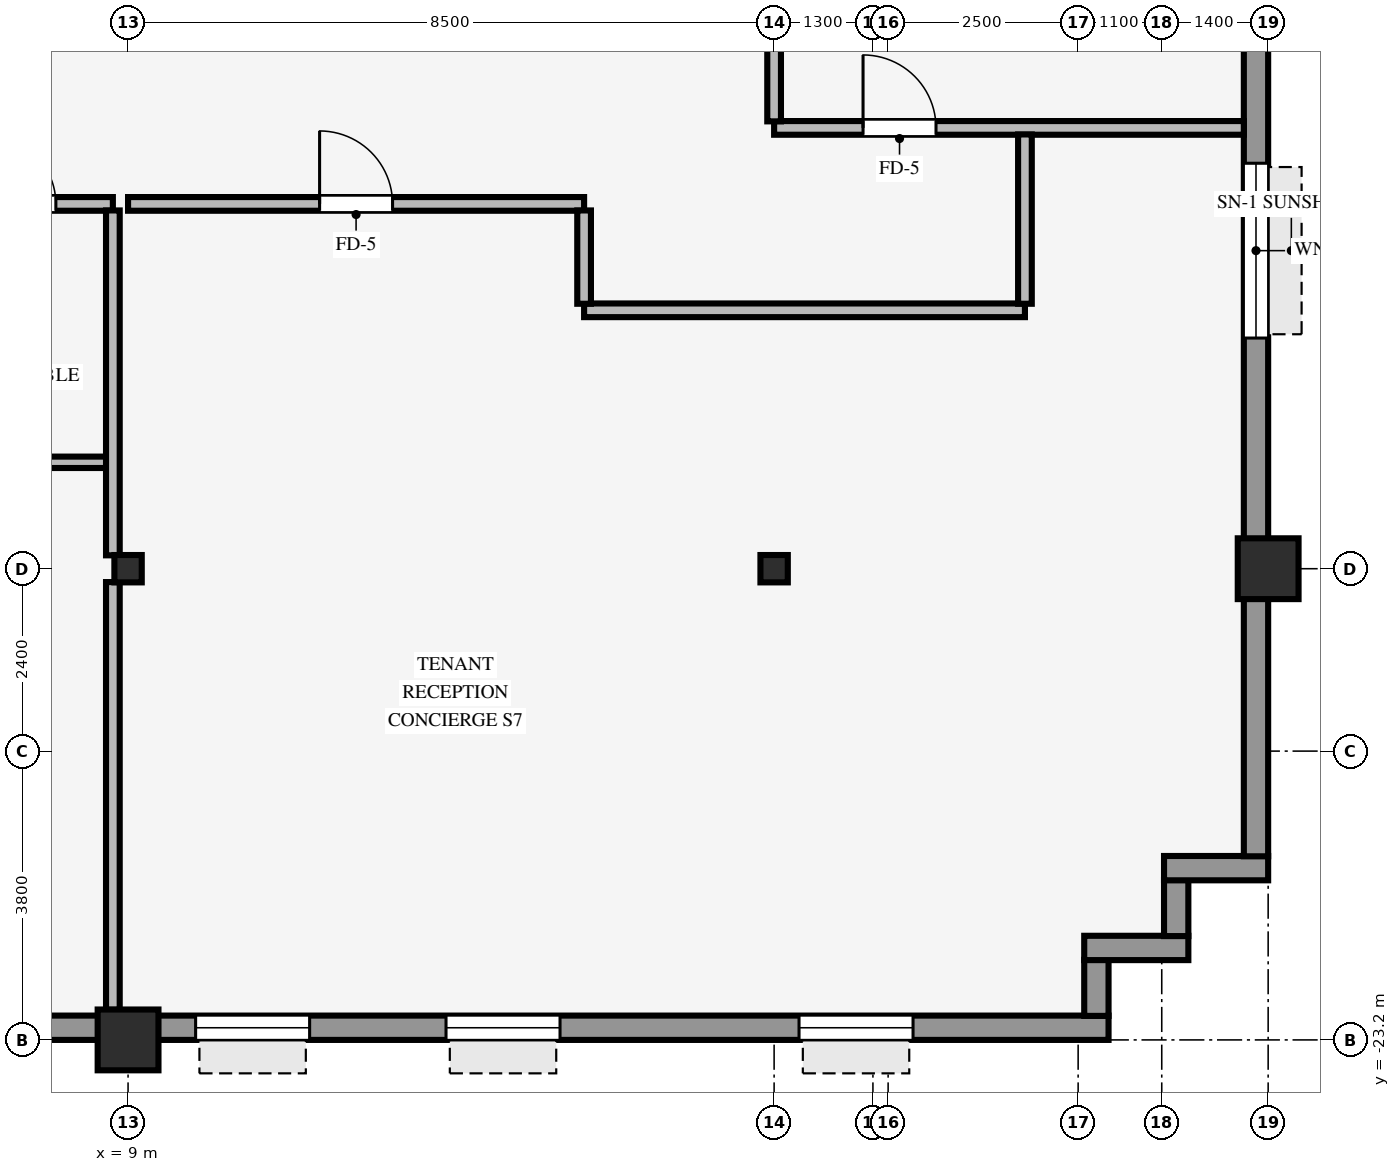
"""IFC4 building model, lengths in metres.
Left out: names, types, materials, properties, quantities, classifications, styles, units other than length and angle.
Written with IfcOpenShell. Run it as: python <this file> out.ifc"""

import sys

from ifc_helpers import new_model, si_unit, direction, frame, frame_2d, origin, origin_2d, place, context, subcontext, project, spatial, rectangle, hollow_rectangle, i_section, extrude, source, transform, mapped, element, fill, save


model = new_model("IFC4")
c1 = context("Model", 3, precision=1e-05, world=origin(), true_north=direction((0.0, 1.0)))
c2 = subcontext(c1, "Body", "Model", "MODEL_VIEW")
j1 = project(units=[si_unit("LENGTHUNIT", "METRE"), si_unit("PLANEANGLEUNIT", "RADIAN")], contexts=[c1])
p1 = place(None, origin())
s1 = spatial("IfcSite", under=j1, at=p1, CompositionType="ELEMENT")
p2 = place(p1, origin())
s2 = spatial("IfcBuilding", under=s1, at=p2, CompositionType="ELEMENT")
p3 = place(p2, frame((0.0, 0.0, 89.65)))
s3 = spatial("IfcBuildingStorey", under=s2, at=p3, CompositionType="ELEMENT", Elevation=89.65)
for number, where, z_axis, x_axis in (
    (1, (24.0, -17.0, 0.0), (0.0, 0.0, 1.0), (1.0, 0.0, 0.0)),
    (2, (9.0, -23.2, 0.0), (0.0, 0.0, 1.0), (1.0, 0.0, 0.0)),
):
    element("IfcColumn", number, at=place(p3, frame(where, z_axis=z_axis, x_axis=x_axis)), inside=s3, PredefinedType="COLUMN", context=c2, shape_type="SweptSolid", body=[
        extrude(hollow_rectangle(XDim=0.8, YDim=0.8, WallThickness=0.055, InnerFilletRadius=0.055, OuterFilletRadius=0.11, at=origin_2d()), origin(), (0.0, 0.0, 1.0), 3.25),
    ])
for number, where, z_axis, x_axis in (
    (3, (9.0, -17.0, 0.0), (0.0, 0.0, 1.0), (1.0, 0.0, 0.0)),
    (4, (17.5, -17.0, 0.0), (0.0, 0.0, 1.0), (1.0, 0.0, 0.0)),
):
    element("IfcColumn", number, at=place(p3, frame(where, z_axis=z_axis, x_axis=x_axis)), inside=s3, PredefinedType="COLUMN", context=c2, shape_type="SweptSolid", body=[
        extrude(i_section(OverallWidth=0.36, OverallDepth=0.36, WebThickness=0.021, FlangeThickness=0.021, FilletRadius=0.018, at=origin_2d()), origin(), (0.0, 0.0, 1.0), 3.25),
    ])
p4 = place(p3, frame((-21.9, -23.04, 0.0), z_axis=(0.0, 0.0, 1.0), x_axis=(1.0, 0.0, 0.0)))
e5 = element("IfcWall", 5, at=p4, inside=s3, PredefinedType="STANDARD", context=c2, shape_type="SweptSolid", body=[
    extrude(rectangle(XDim=43.8, YDim=0.32, at=frame_2d((21.9, 0.0))), origin(), (0.0, 0.0, 1.0), 2.585),
])
p5 = place(p4, frame((1.672, 0.0, 0.8)))
e6 = element("IfcOpeningElement", 6, at=p5, cuts=e5, PredefinedType="OPENING", context=c2, shape_type="SweptSolid", body=[
    extrude(rectangle(XDim=1.5, YDim=1.6, at=frame_2d((0.75, 0.8))), frame((0.0, 0.17, 0.0), z_axis=(0.0, -1.0, 0.0), x_axis=(1.0, 0.0, 0.0)), (0.0, 0.0, 1.0), 0.34),
])
p6 = place(p4, frame((6.317, 0.0, 0.8)))
e7 = element("IfcOpeningElement", 7, at=p6, cuts=e5, PredefinedType="OPENING", context=c2, shape_type="SweptSolid", body=[
    extrude(rectangle(XDim=1.5, YDim=1.6, at=frame_2d((0.75, 0.8))), frame((0.0, 0.17, 0.0), z_axis=(0.0, -1.0, 0.0), x_axis=(1.0, 0.0, 0.0)), (0.0, 0.0, 1.0), 0.34),
])
p7 = place(p4, frame((17.856, 0.0, 0.8)))
e8 = element("IfcOpeningElement", 8, at=p7, cuts=e5, PredefinedType="OPENING", context=c2, shape_type="SweptSolid", body=[
    extrude(rectangle(XDim=1.5, YDim=1.6, at=frame_2d((0.75, 0.8))), frame((0.0, 0.17, 0.0), z_axis=(0.0, -1.0, 0.0), x_axis=(1.0, 0.0, 0.0)), (0.0, 0.0, 1.0), 0.34),
])
p8 = place(p4, frame((25.794, 0.0, 0.8)))
e9 = element("IfcOpeningElement", 9, at=p8, cuts=e5, PredefinedType="OPENING", context=c2, shape_type="SweptSolid", body=[
    extrude(rectangle(XDim=1.5, YDim=1.6, at=frame_2d((0.75, 0.8))), frame((0.0, 0.17, 0.0), z_axis=(0.0, -1.0, 0.0), x_axis=(1.0, 0.0, 0.0)), (0.0, 0.0, 1.0), 0.34),
])
p9 = place(p4, frame((31.789, 0.0, 0.8)))
e10 = element("IfcOpeningElement", 10, at=p9, cuts=e5, PredefinedType="OPENING", context=c2, shape_type="SweptSolid", body=[
    extrude(rectangle(XDim=1.5, YDim=1.6, at=frame_2d((0.75, 0.8))), frame((0.0, 0.17, 0.0), z_axis=(0.0, -1.0, 0.0), x_axis=(1.0, 0.0, 0.0)), (0.0, 0.0, 1.0), 0.34),
])
p10 = place(p4, frame((35.083, 0.0, 0.8)))
e11 = element("IfcOpeningElement", 11, at=p10, cuts=e5, PredefinedType="OPENING", context=c2, shape_type="SweptSolid", body=[
    extrude(rectangle(XDim=1.5, YDim=1.6, at=frame_2d((0.75, 0.8))), frame((0.0, 0.17, 0.0), z_axis=(0.0, -1.0, 0.0), x_axis=(1.0, 0.0, 0.0)), (0.0, 0.0, 1.0), 0.34),
])
p11 = place(p4, frame((39.728, 0.0, 0.8)))
e12 = element("IfcOpeningElement", 12, at=p11, cuts=e5, PredefinedType="OPENING", context=c2, shape_type="SweptSolid", body=[
    extrude(rectangle(XDim=1.5, YDim=1.6, at=frame_2d((0.75, 0.8))), frame((0.0, 0.17, 0.0), z_axis=(0.0, -1.0, 0.0), x_axis=(1.0, 0.0, 0.0)), (0.0, 0.0, 1.0), 0.34),
])
p12 = place(p3, frame((21.74, -22.884, 0.0), z_axis=(0.0, 0.0, 1.0), x_axis=(0.0, 1.0, 0.0)))
e13 = element("IfcWall", 13, at=p12, inside=s3, PredefinedType="STANDARD", context=c2, shape_type="SweptSolid", body=[
    extrude(rectangle(XDim=0.738, YDim=0.32, at=frame_2d((0.369, 0.0))), origin(), (0.0, 0.0, 1.0), 3.24),
])
p13 = place(p3, frame((21.58, -21.99, 0.0), z_axis=(0.0, 0.0, 1.0), x_axis=(1.0, 0.0, 0.0)))
e14 = element("IfcWall", 14, at=p13, inside=s3, PredefinedType="STANDARD", context=c2, shape_type="SweptSolid", body=[
    extrude(rectangle(XDim=1.37, YDim=0.32, at=frame_2d((0.685, 0.0))), origin(), (0.0, 0.0, 1.0), 3.24),
])
p14 = place(p3, frame((22.79, -21.834, 0.0), z_axis=(0.0, 0.0, 1.0), x_axis=(0.0, 1.0, 0.0)))
e15 = element("IfcWall", 15, at=p14, inside=s3, PredefinedType="STANDARD", context=c2, shape_type="SweptSolid", body=[
    extrude(rectangle(XDim=0.738, YDim=0.32, at=frame_2d((0.369, 0.0))), origin(), (0.0, 0.0, 1.0), 3.24),
])
p15 = place(p3, frame((22.63, -20.94, 0.0), z_axis=(0.0, 0.0, 1.0), x_axis=(1.0, 0.0, 0.0)))
e16 = element("IfcWall", 16, at=p15, inside=s3, PredefinedType="STANDARD", context=c2, shape_type="SweptSolid", body=[
    extrude(rectangle(XDim=1.37, YDim=0.32, at=frame_2d((0.685, 0.0))), origin(), (0.0, 0.0, 1.0), 3.24),
])
p16 = place(p3, frame((23.84, -20.784, 0.0), z_axis=(0.0, 0.0, 1.0), x_axis=(0.0, 1.0, 0.0)))
e17 = element("IfcWall", 17, at=p16, inside=s3, PredefinedType="STANDARD", context=c2, shape_type="SweptSolid", body=[
    extrude(rectangle(XDim=41.568, YDim=0.32, at=frame_2d((20.784, 0.0))), origin(), (0.0, 0.0, 1.0), 2.585),
])
p17 = place(p16, frame((6.819, 0.0, 0.8)))
e18 = element("IfcOpeningElement", 18, at=p17, cuts=e17, PredefinedType="OPENING", context=c2, shape_type="SweptSolid", body=[
    extrude(rectangle(XDim=2.3, YDim=1.62, at=frame_2d((1.15, 0.81))), frame((0.0, 0.17, 0.0), z_axis=(0.0, -1.0, 0.0), x_axis=(1.0, 0.0, 0.0)), (0.0, 0.0, 1.0), 0.34),
])
p18 = place(p16, frame((12.215, 0.0, 0.8)))
e19 = element("IfcOpeningElement", 19, at=p18, cuts=e17, PredefinedType="OPENING", context=c2, shape_type="SweptSolid", body=[
    extrude(rectangle(XDim=2.3, YDim=1.62, at=frame_2d((1.15, 0.81))), frame((0.0, 0.17, 0.0), z_axis=(0.0, -1.0, 0.0), x_axis=(1.0, 0.0, 0.0)), (0.0, 0.0, 1.0), 0.34),
])
p19 = place(p16, frame((17.161, 0.0, 0.8)))
e20 = element("IfcOpeningElement", 20, at=p19, cuts=e17, PredefinedType="OPENING", context=c2, shape_type="SweptSolid", body=[
    extrude(rectangle(XDim=2.3, YDim=1.62, at=frame_2d((1.15, 0.81))), frame((0.0, 0.17, 0.0), z_axis=(0.0, -1.0, 0.0), x_axis=(1.0, 0.0, 0.0)), (0.0, 0.0, 1.0), 0.34),
])
p20 = place(p16, frame((27.053, 0.0, 0.8)))
e21 = element("IfcOpeningElement", 21, at=p20, cuts=e17, PredefinedType="OPENING", context=c2, shape_type="SweptSolid", body=[
    extrude(rectangle(XDim=2.3, YDim=1.62, at=frame_2d((1.15, 0.81))), frame((0.0, 0.17, 0.0), z_axis=(0.0, -1.0, 0.0), x_axis=(1.0, 0.0, 0.0)), (0.0, 0.0, 1.0), 0.34),
])
p21 = place(p16, frame((32.449, 0.0, 0.8)))
e22 = element("IfcOpeningElement", 22, at=p21, cuts=e17, PredefinedType="OPENING", context=c2, shape_type="SweptSolid", body=[
    extrude(rectangle(XDim=2.3, YDim=1.62, at=frame_2d((1.15, 0.81))), frame((0.0, 0.17, 0.0), z_axis=(0.0, -1.0, 0.0), x_axis=(1.0, 0.0, 0.0)), (0.0, 0.0, 1.0), 0.34),
])
p22 = place(p3, frame((1.2, -15.6, 0.0), z_axis=(0.0, 0.0, 1.0), x_axis=(1.0, 0.0, 0.0)))
e23 = element("IfcWall", 23, at=p22, inside=s3, PredefinedType="PARTITIONING", context=c2, shape_type="SweptSolid", body=[
    extrude(rectangle(XDim=7.514, YDim=0.15, at=frame_2d((3.757, 0.0))), origin(), (0.0, 0.0, 1.0), 3.24),
])
p23 = place(p3, frame((15.0, -13.6, 0.0), z_axis=(0.0, 0.0, 1.0), x_axis=(1.0, 0.0, 0.0)))
e24 = element("IfcWall", 24, at=p23, inside=s3, PredefinedType="PARTITIONING", context=c2, shape_type="SweptSolid", body=[
    extrude(rectangle(XDim=5.8, YDim=0.18, at=frame_2d((2.9, 0.0))), origin(), (0.0, 0.0, 1.0), 2.878),
])
p24 = place(p3, frame((-15.0, -12.2, 0.0), z_axis=(0.0, 0.0, 1.0), x_axis=(1.0, 0.0, 0.0)))
e25 = element("IfcWall", 25, at=p24, inside=s3, PredefinedType="PARTITIONING", context=c2, shape_type="SweptSolid", body=[
    extrude(rectangle(XDim=23.8, YDim=0.18, at=frame_2d((11.9, 0.0))), origin(), (0.0, 0.0, 1.0), 3.24),
])
p25 = place(p24, frame((7.325, 0.0, 0.0)))
e26 = element("IfcOpeningElement", 26, at=p25, cuts=e25, PredefinedType="OPENING", context=c2, shape_type="SweptSolid", body=[
    extrude(rectangle(XDim=0.96, YDim=2.1, at=frame_2d((0.48, 1.05))), frame((0.0, 0.1, 0.0), z_axis=(0.0, -1.0, 0.0), x_axis=(1.0, 0.0, 0.0)), (0.0, 0.0, 1.0), 0.2),
])
p26 = place(p24, frame((2.8, 0.0, 0.0)))
e27 = element("IfcOpeningElement", 27, at=p26, cuts=e25, PredefinedType="OPENING", context=c2, shape_type="SweptSolid", body=[
    extrude(rectangle(XDim=0.96, YDim=2.1, at=frame_2d((0.48, 1.05))), frame((0.0, 0.1, 0.0), z_axis=(0.0, -1.0, 0.0), x_axis=(1.0, 0.0, 0.0)), (0.0, 0.0, 1.0), 0.2),
])
p27 = place(p24, frame((19.65, 0.0, 0.0)))
e28 = element("IfcOpeningElement", 28, at=p27, cuts=e25, PredefinedType="OPENING", context=c2, shape_type="SweptSolid", body=[
    extrude(rectangle(XDim=0.9, YDim=2.1, at=frame_2d((0.45, 1.05))), frame((0.0, 0.1, 0.0), z_axis=(0.0, -1.0, 0.0), x_axis=(1.0, 0.0, 0.0)), (0.0, 0.0, 1.0), 0.2),
])
p28 = place(p24, frame((17.05, 0.0, 0.0)))
e29 = element("IfcOpeningElement", 29, at=p28, cuts=e25, PredefinedType="OPENING", context=c2, shape_type="SweptSolid", body=[
    extrude(rectangle(XDim=0.9, YDim=2.1, at=frame_2d((0.45, 1.05))), frame((0.0, 0.1, 0.0), z_axis=(0.0, -1.0, 0.0), x_axis=(1.0, 0.0, 0.0)), (0.0, 0.0, 1.0), 0.2),
])
p29 = place(p24, frame((22.15, 0.0, 0.0)))
e30 = element("IfcOpeningElement", 30, at=p29, cuts=e25, PredefinedType="OPENING", context=c2, shape_type="SweptSolid", body=[
    extrude(rectangle(XDim=0.9, YDim=2.1, at=frame_2d((0.45, 1.05))), frame((0.0, 0.1, 0.0), z_axis=(0.0, -1.0, 0.0), x_axis=(1.0, 0.0, 0.0)), (0.0, 0.0, 1.0), 0.2),
])
p30 = place(p24, frame((12.52, 0.0, 0.0)))
e31 = element("IfcOpeningElement", 31, at=p30, cuts=e25, PredefinedType="OPENING", context=c2, shape_type="SweptSolid", body=[
    extrude(rectangle(XDim=0.96, YDim=2.1, at=frame_2d((0.48, 1.05))), frame((0.0, 0.1, 0.0), z_axis=(0.0, -1.0, 0.0), x_axis=(1.0, 0.0, 0.0)), (0.0, 0.0, 1.0), 0.2),
])
p31 = place(p24, frame((14.72, 0.0, 0.0)))
e32 = element("IfcOpeningElement", 32, at=p31, cuts=e25, PredefinedType="OPENING", context=c2, shape_type="SweptSolid", body=[
    extrude(rectangle(XDim=0.96, YDim=2.1, at=frame_2d((0.48, 1.05))), frame((0.0, 0.1, 0.0), z_axis=(0.0, -1.0, 0.0), x_axis=(1.0, 0.0, 0.0)), (0.0, 0.0, 1.0), 0.2),
])
p32 = place(p3, frame((9.0, -12.2, 0.0), z_axis=(0.0, 0.0, 1.0), x_axis=(1.0, 0.0, 0.0)))
e33 = element("IfcWall", 33, at=p32, inside=s3, PredefinedType="PARTITIONING", context=c2, shape_type="SweptSolid", body=[
    extrude(rectangle(XDim=6.0, YDim=0.18, at=frame_2d((3.0, 0.0))), origin(), (0.0, 0.0, 1.0), 3.24),
])
p33 = place(p32, frame((2.52, 0.0, 0.0)))
e34 = element("IfcOpeningElement", 34, at=p33, cuts=e33, PredefinedType="OPENING", context=c2, shape_type="SweptSolid", body=[
    extrude(rectangle(XDim=0.96, YDim=2.1, at=frame_2d((0.48, 1.05))), frame((0.0, 0.1, 0.0), z_axis=(0.0, -1.0, 0.0), x_axis=(1.0, 0.0, 0.0)), (0.0, 0.0, 1.0), 0.2),
])
p34 = place(p3, frame((17.5, -11.2, 0.0), z_axis=(0.0, 0.0, 1.0), x_axis=(1.0, 0.0, 0.0)))
e35 = element("IfcWall", 35, at=p34, inside=s3, PredefinedType="PARTITIONING", context=c2, shape_type="SweptSolid", body=[
    extrude(rectangle(XDim=6.18, YDim=0.18, at=frame_2d((3.09, 0.0))), origin(), (0.0, 0.0, 1.0), 3.24),
])
p35 = place(p34, frame((1.17, 0.0, 0.0)))
e36 = element("IfcOpeningElement", 36, at=p35, cuts=e35, PredefinedType="OPENING", context=c2, shape_type="SweptSolid", body=[
    extrude(rectangle(XDim=0.96, YDim=2.1, at=frame_2d((0.48, 1.05))), frame((0.0, 0.1, 0.0), z_axis=(0.0, -1.0, 0.0), x_axis=(1.0, 0.0, 0.0)), (0.0, 0.0, 1.0), 0.2),
])
p36 = place(p3, frame((8.8, -22.804, 0.0), z_axis=(0.0, 0.0, 1.0), x_axis=(0.0, 1.0, 0.0)))
e37 = element("IfcWall", 37, at=p36, inside=s3, PredefinedType="PARTITIONING", context=c2, shape_type="SweptSolid", body=[
    extrude(rectangle(XDim=5.628, YDim=0.18, at=frame_2d((2.814, 0.0))), origin(), (0.0, 0.0, 1.0), 2.335),
])
p37 = place(p3, frame((8.8, -16.824, 0.0), z_axis=(0.0, 0.0, 1.0), x_axis=(0.0, 1.0, 0.0)))
e38 = element("IfcWall", 38, at=p37, inside=s3, PredefinedType="PARTITIONING", context=c2, shape_type="SweptSolid", body=[
    extrude(rectangle(XDim=4.538, YDim=0.18, at=frame_2d((2.269, 0.0))), origin(), (0.0, 0.0, 1.0), 2.335),
])
p38 = place(p3, frame((15.0, -13.514, 0.0), z_axis=(0.0, 0.0, 1.0), x_axis=(0.0, 1.0, 0.0)))
e39 = element("IfcWall", 39, at=p38, inside=s3, PredefinedType="PARTITIONING", context=c2, shape_type="SweptSolid", body=[
    extrude(rectangle(XDim=1.228, YDim=0.18, at=frame_2d((0.614, 0.0))), origin(), (0.0, 0.0, 1.0), 3.24),
])
p39 = place(p3, frame((17.5, -11.114, 0.0), z_axis=(0.0, 0.0, 1.0), x_axis=(0.0, 1.0, 0.0)))
e40 = element("IfcWall", 40, at=p39, inside=s3, PredefinedType="PARTITIONING", context=c2, shape_type="SweptSolid", body=[
    extrude(rectangle(XDim=0.968, YDim=0.18, at=frame_2d((0.484, 0.0))), origin(), (0.0, 0.0, 1.0), 2.335),
])
p40 = place(p3, frame((20.8, -13.514, 0.0), z_axis=(0.0, 0.0, 1.0), x_axis=(0.0, 1.0, 0.0)))
e41 = element("IfcWall", 41, at=p40, inside=s3, PredefinedType="PARTITIONING", context=c2, shape_type="SweptSolid", body=[
    extrude(rectangle(XDim=2.228, YDim=0.18, at=frame_2d((1.114, 0.0))), origin(), (0.0, 0.0, 1.0), 3.24),
])
m1 = source(origin(), c2, "Body", "SweptSolid", [
    extrude(rectangle(XDim=1.5, YDim=1.6, at=frame_2d((0.75, 0.8))), frame((0.0, 0.03, 0.0), z_axis=(0.0, -1.0, 0.0), x_axis=(1.0, 0.0, 0.0)), (0.0, 0.0, 1.0), 0.06),
])
p41 = place(p9, origin())
e42 = element("IfcWindow", 42, at=p41, inside=s3, PartitioningType="SINGLE_PANEL", PredefinedType="WINDOW", context=c2, shape_type="MappedRepresentation", body=[
    mapped(m1, transform((0.0, 0.0, 0.0), scale=1.0)),
])
fill(e10, e42)
p42 = place(p10, origin())
e43 = element("IfcWindow", 43, at=p42, inside=s3, PartitioningType="SINGLE_PANEL", PredefinedType="WINDOW", context=c2, shape_type="MappedRepresentation", body=[
    mapped(m1, transform((0.0, 0.0, 0.0), scale=1.0)),
])
fill(e11, e43)
p43 = place(p11, origin())
e44 = element("IfcWindow", 44, at=p43, inside=s3, PartitioningType="SINGLE_PANEL", PredefinedType="WINDOW", context=c2, shape_type="MappedRepresentation", body=[
    mapped(m1, transform((0.0, 0.0, 0.0), scale=1.0)),
])
fill(e12, e44)
m2 = source(origin(), c2, "Body", "SweptSolid", [
    extrude(rectangle(XDim=2.3, YDim=1.62, at=frame_2d((1.15, 0.81))), frame((0.0, 0.03, 0.0), z_axis=(0.0, -1.0, 0.0), x_axis=(1.0, 0.0, 0.0)), (0.0, 0.0, 1.0), 0.06),
])
p44 = place(p17, origin())
e45 = element("IfcWindow", 45, at=p44, inside=s3, PartitioningType="SINGLE_PANEL", PredefinedType="WINDOW", context=c2, shape_type="MappedRepresentation", body=[
    mapped(m2, transform((0.0, 0.0, 0.0), scale=1.0)),
])
fill(e18, e45)
m3 = source(origin(), c2, "Body", "SweptSolid", [
    extrude(rectangle(XDim=0.96, YDim=2.1, at=frame_2d((0.48, 1.05))), frame((0.0, 0.025, 0.0), z_axis=(0.0, -1.0, 0.0), x_axis=(1.0, 0.0, 0.0)), (0.0, 0.0, 1.0), 0.05),
])
p45 = place(p33, origin())
e46 = element("IfcDoor", 46, at=p45, inside=s3, OperationType="SINGLE_SWING_LEFT", PredefinedType="DOOR", context=c2, shape_type="MappedRepresentation", body=[
    mapped(m3, transform((0.0, 0.0, 0.0), scale=1.0)),
])
fill(e34, e46)
p46 = place(p35, origin())
e47 = element("IfcDoor", 47, at=p46, inside=s3, OperationType="SINGLE_SWING_LEFT", PredefinedType="DOOR", context=c2, shape_type="MappedRepresentation", body=[
    mapped(m3, transform((0.0, 0.0, 0.0), scale=1.0)),
])
fill(e36, e47)
m4 = source(origin(), c2, "Body", "SweptSolid", [
    extrude(rectangle(XDim=0.9, YDim=2.1, at=frame_2d((0.45, 1.05))), frame((0.0, 0.025, 0.0), z_axis=(0.0, -1.0, 0.0), x_axis=(1.0, 0.0, 0.0)), (0.0, 0.0, 1.0), 0.05),
])
p47 = place(p29, origin())
e48 = element("IfcDoor", 48, at=p47, inside=s3, OperationType="SINGLE_SWING_LEFT", PredefinedType="DOOR", context=c2, shape_type="MappedRepresentation", body=[
    mapped(m4, transform((0.0, 0.0, 0.0), scale=1.0)),
])
fill(e30, e48)
save(model, sys.argv[1])
